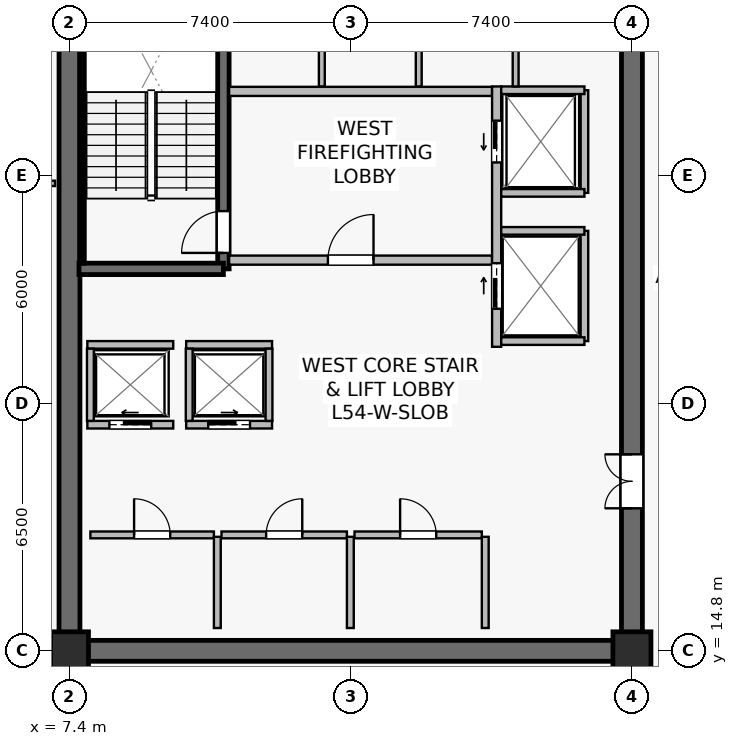
"""IFC4 building model, lengths in metres.
Left out: names, types, materials, properties, quantities, classifications, styles, units other than length and angle.
Written with IfcOpenShell. Run it as: python <this file> out.ifc"""

import sys

from ifc_helpers import new_model, si_unit, direction, frame, frame_2d, origin, origin_2d, place, context, subcontext, project, spatial, rectangle, extrude, source, transform, mapped, element, fill, save


model = new_model("IFC4")
c1 = context("Model", 3, precision=1e-05, world=origin(), true_north=direction((0.0, 1.0)))
c2 = subcontext(c1, "Body", "Model", "MODEL_VIEW")
j1 = project(units=[si_unit("LENGTHUNIT", "METRE"), si_unit("PLANEANGLEUNIT", "RADIAN")], contexts=[c1])
p1 = place(None, origin())
s1 = spatial("IfcSite", under=j1, at=p1, CompositionType="ELEMENT")
p2 = place(p1, origin())
s2 = spatial("IfcBuilding", under=s1, at=p2, CompositionType="ELEMENT")
p3 = place(p2, frame((0.0, 0.0, 226.0)))
s3 = spatial("IfcBuildingStorey", under=s2, at=p3, CompositionType="ELEMENT", Elevation=226.0)
p4 = place(p3, frame((7.125, 14.8, 0.0), z_axis=(0.0, 0.0, 1.0), x_axis=(1.0, 0.0, 0.0)))
e1 = element("IfcWall", 1, at=p4, inside=s3, PredefinedType="SHEAR", context=c2, shape_type="SweptSolid", body=[
    extrude(rectangle(XDim=15.35, YDim=0.55, at=frame_2d((7.675, 0.0))), origin(), (0.0, 0.0, 1.0), 3.8),
])
p5 = place(p3, frame((7.4, 15.075, 0.0), z_axis=(0.0, 0.0, 1.0), x_axis=(0.0, 1.0, 0.0)))
e2 = element("IfcWall", 2, at=p5, inside=s3, PredefinedType="SHEAR", context=c2, shape_type="SweptSolid", body=[
    extrude(rectangle(XDim=18.45, YDim=0.55, at=frame_2d((9.225, 0.0))), origin(), (0.0, 0.0, 1.0), 3.8),
])
p6 = place(p3, frame((22.2, 15.075, 0.0), z_axis=(0.0, 0.0, 1.0), x_axis=(0.0, 1.0, 0.0)))
e3 = element("IfcWall", 3, at=p6, inside=s3, PredefinedType="SHEAR", context=c2, shape_type="SweptSolid", body=[
    extrude(rectangle(XDim=18.45, YDim=0.55, at=frame_2d((9.225, 0.0))), origin(), (0.0, 0.0, 1.0), 3.8),
])
p7 = place(p6, frame((3.475, 0.0, 0.0)))
e4 = element("IfcOpeningElement", 4, at=p7, cuts=e3, PredefinedType="OPENING", context=c2, shape_type="SweptSolid", body=[
    extrude(rectangle(XDim=1.42, YDim=2.2, at=frame_2d((0.71, 1.1))), frame((0.0, 0.285, 0.0), z_axis=(0.0, -1.0, 0.0), x_axis=(1.0, 0.0, 0.0)), (0.0, 0.0, 1.0), 0.57),
])
p8 = place(p3, frame((11.45, 24.85, 0.0), z_axis=(0.0, 0.0, 1.0), x_axis=(0.0, 1.0, 0.0)))
e5 = element("IfcWall", 5, at=p8, inside=s3, PredefinedType="SHEAR", context=c2, shape_type="SweptSolid", body=[
    extrude(rectangle(XDim=8.63, YDim=0.3, at=frame_2d((4.315, 0.0))), origin(), (0.0, 0.0, 1.0), 3.8),
])
p9 = place(p8, frame((0.42, 0.0, 0.0)))
e6 = element("IfcOpeningElement", 6, at=p9, cuts=e5, PredefinedType="OPENING", context=c2, shape_type="SweptSolid", body=[
    extrude(rectangle(XDim=1.1, YDim=2.15, at=frame_2d((0.55, 1.075))), frame((0.0, 0.16, 0.0), z_axis=(0.0, -1.0, 0.0), x_axis=(1.0, 0.0, 0.0)), (0.0, 0.0, 1.0), 0.32),
])
p10 = place(p3, frame((7.65, 24.85, 0.0), z_axis=(0.0, 0.0, 1.0), x_axis=(1.0, 0.0, 0.0)))
e7 = element("IfcWall", 7, at=p10, inside=s3, PredefinedType="SHEAR", context=c2, shape_type="SweptSolid", body=[
    extrude(rectangle(XDim=3.8, YDim=0.3, at=frame_2d((1.9, 0.0))), origin(), (0.0, 0.0, 1.0), 3.8),
])
p11 = place(p3, frame((7.73, 25.0, 0.0), z_axis=(0.0, 0.0, 1.0), x_axis=(0.0, 1.0, 0.0)))
e8 = element("IfcWall", 8, at=p11, inside=s3, PredefinedType="SOLIDWALL", context=c2, shape_type="SweptSolid", body=[
    extrude(rectangle(XDim=8.32, YDim=0.12, at=frame_2d((4.16, 0.0))), origin(), (0.0, 0.0, 1.0), 3.8),
])
m1 = source(origin(), c2, "Body", "SweptSolid", [
    extrude(rectangle(XDim=1.0, YDim=1.0, at=origin_2d()), origin(), (0.0, 0.0, 1.0), 4.1),
])
for number, where, z_axis, x_axis in (
    (9, (7.4, 14.8, 0.0), (0.0, 0.0, 1.0), (1.0, 0.0, 0.0)),
    (10, (22.2, 14.8, 0.0), (0.0, 0.0, 1.0), (1.0, 0.0, 0.0)),
):
    element("IfcColumn", number, at=place(p3, frame(where, z_axis=z_axis, x_axis=x_axis)), inside=s3, PredefinedType="COLUMN", context=c2, shape_type="MappedRepresentation", body=[
        mapped(m1, transform((0.0, 0.0, 0.0), scale=1.0)),
    ])
p12 = place(p3, frame((11.6, 25.08, 0.0), z_axis=(0.0, 0.0, 1.0), x_axis=(1.0, 0.0, 0.0)))
e11 = element("IfcWall", 11, at=p12, inside=s3, PredefinedType="SOLIDWALL", context=c2, shape_type="SweptSolid", body=[
    extrude(rectangle(XDim=6.92, YDim=0.24, at=frame_2d((3.46, 0.0))), origin(), (0.0, 0.0, 1.0), 3.197),
])
p13 = place(p12, frame((2.6, 0.0, 0.0)))
e12 = element("IfcOpeningElement", 12, at=p13, cuts=e11, PredefinedType="OPENING", context=c2, shape_type="SweptSolid", body=[
    extrude(rectangle(XDim=1.2, YDim=2.16, at=frame_2d((0.6, 1.08))), frame((0.0, 0.13, 0.0), z_axis=(0.0, -1.0, 0.0), x_axis=(1.0, 0.0, 0.0)), (0.0, 0.0, 1.0), 0.26),
])
p14 = place(p3, frame((11.6, 29.52, 0.0), z_axis=(0.0, 0.0, 1.0), x_axis=(1.0, 0.0, 0.0)))
e13 = element("IfcWall", 13, at=p14, inside=s3, PredefinedType="SOLIDWALL", context=c2, shape_type="SweptSolid", body=[
    extrude(rectangle(XDim=6.92, YDim=0.24, at=frame_2d((3.46, 0.0))), origin(), (0.0, 0.0, 1.0), 3.197),
])
p15 = place(p3, frame((18.64, 22.8, 0.0), z_axis=(0.0, 0.0, 1.0), x_axis=(0.0, 1.0, 0.0)))
e14 = element("IfcWall", 14, at=p15, inside=s3, PredefinedType="SOLIDWALL", context=c2, shape_type="SweptSolid", body=[
    extrude(rectangle(XDim=6.85, YDim=0.24, at=frame_2d((3.425, 0.0))), origin(), (0.0, 0.0, 1.0), 2.935),
])
p16 = place(p15, frame((4.85, 0.0, 0.0)))
e15 = element("IfcOpeningElement", 15, at=p16, cuts=e14, PredefinedType="OPENING", context=c2, shape_type="SweptSolid", body=[
    extrude(rectangle(XDim=1.1, YDim=2.22, at=frame_2d((0.55, 1.11))), frame((0.0, 0.13, 0.0), z_axis=(0.0, -1.0, 0.0), x_axis=(1.0, 0.0, 0.0)), (0.0, 0.0, 1.0), 0.26),
])
p17 = place(p15, frame((1.0, 0.0, 0.0)))
e16 = element("IfcOpeningElement", 16, at=p17, cuts=e14, PredefinedType="OPENING", context=c2, shape_type="SweptSolid", body=[
    extrude(rectangle(XDim=1.2, YDim=2.22, at=frame_2d((0.6, 1.11))), frame((0.0, 0.13, 0.0), z_axis=(0.0, -1.0, 0.0), x_axis=(1.0, 0.0, 0.0)), (0.0, 0.0, 1.0), 0.26),
])
p18 = place(p3, frame((7.87, 20.75, 0.0), z_axis=(0.0, 0.0, 1.0), x_axis=(1.0, 0.0, 0.0)))
e17 = element("IfcWall", 17, at=p18, inside=s3, PredefinedType="SOLIDWALL", context=c2, shape_type="SweptSolid", body=[
    extrude(rectangle(XDim=2.26, YDim=0.2, at=frame_2d((1.13, 0.0))), origin(), (0.0, 0.0, 1.0), 3.8),
])
p19 = place(p18, frame((0.58, 0.0, 0.0)))
e18 = element("IfcOpeningElement", 18, at=p19, cuts=e17, PredefinedType="OPENING", context=c2, shape_type="SweptSolid", body=[
    extrude(rectangle(XDim=1.1, YDim=2.22, at=frame_2d((0.55, 1.11))), frame((0.0, 0.11, 0.0), z_axis=(0.0, -1.0, 0.0), x_axis=(1.0, 0.0, 0.0)), (0.0, 0.0, 1.0), 0.22),
])
p20 = place(p3, frame((7.87, 22.85, 0.0), z_axis=(0.0, 0.0, 1.0), x_axis=(1.0, 0.0, 0.0)))
e19 = element("IfcWall", 19, at=p20, inside=s3, PredefinedType="SOLIDWALL", context=c2, shape_type="SweptSolid", body=[
    extrude(rectangle(XDim=2.26, YDim=0.2, at=frame_2d((1.13, 0.0))), origin(), (0.0, 0.0, 1.0), 3.8),
])
p21 = place(p3, frame((7.95, 20.85, 0.0), z_axis=(0.0, 0.0, 1.0), x_axis=(0.0, 1.0, 0.0)))
e20 = element("IfcWall", 20, at=p21, inside=s3, PredefinedType="SOLIDWALL", context=c2, shape_type="SweptSolid", body=[
    extrude(rectangle(XDim=1.9, YDim=0.18, at=frame_2d((0.95, 0.0))), origin(), (0.0, 0.0, 1.0), 3.8),
])
p22 = place(p3, frame((10.47, 20.75, 0.0), z_axis=(0.0, 0.0, 1.0), x_axis=(1.0, 0.0, 0.0)))
e21 = element("IfcWall", 21, at=p22, inside=s3, PredefinedType="SOLIDWALL", context=c2, shape_type="SweptSolid", body=[
    extrude(rectangle(XDim=2.26, YDim=0.2, at=frame_2d((1.13, 0.0))), origin(), (0.0, 0.0, 1.0), 3.8),
])
p23 = place(p22, frame((0.58, 0.0, 0.0)))
e22 = element("IfcOpeningElement", 22, at=p23, cuts=e21, PredefinedType="OPENING", context=c2, shape_type="SweptSolid", body=[
    extrude(rectangle(XDim=1.1, YDim=2.22, at=frame_2d((0.55, 1.11))), frame((0.0, 0.11, 0.0), z_axis=(0.0, -1.0, 0.0), x_axis=(1.0, 0.0, 0.0)), (0.0, 0.0, 1.0), 0.22),
])
p24 = place(p3, frame((10.47, 22.85, 0.0), z_axis=(0.0, 0.0, 1.0), x_axis=(1.0, 0.0, 0.0)))
e23 = element("IfcWall", 23, at=p24, inside=s3, PredefinedType="SOLIDWALL", context=c2, shape_type="SweptSolid", body=[
    extrude(rectangle(XDim=2.26, YDim=0.2, at=frame_2d((1.13, 0.0))), origin(), (0.0, 0.0, 1.0), 3.8),
])
for number, where, z_axis, x_axis in (
    (24, (10.55, 20.85, 0.0), (0.0, 0.0, 1.0), (0.0, 1.0, 0.0)),
    (25, (12.65, 20.85, 0.0), (0.0, 0.0, 1.0), (0.0, 1.0, 0.0)),
):
    element("IfcWall", number, at=place(p3, frame(where, z_axis=z_axis, x_axis=x_axis)), inside=s3, PredefinedType="SOLIDWALL", context=c2, shape_type="SweptSolid", body=[
        extrude(rectangle(XDim=1.9, YDim=0.18, at=frame_2d((0.95, 0.0))), origin(), (0.0, 0.0, 1.0), 3.8),
    ])
p25 = place(p3, frame((20.95, 26.85, 0.0), z_axis=(0.0, 0.0, 1.0), x_axis=(0.0, 1.0, 0.0)))
e26 = element("IfcWall", 26, at=p25, inside=s3, PredefinedType="SOLIDWALL", context=c2, shape_type="SweptSolid", body=[
    extrude(rectangle(XDim=2.7, YDim=0.2, at=frame_2d((1.35, 0.0))), origin(), (0.0, 0.0, 1.0), 3.8),
])
p26 = place(p3, frame((18.76, 29.55, 0.0), z_axis=(0.0, 0.0, 1.0), x_axis=(1.0, 0.0, 0.0)))
e27 = element("IfcWall", 27, at=p26, inside=s3, PredefinedType="SOLIDWALL", context=c2, shape_type="SweptSolid", body=[
    extrude(rectangle(XDim=2.19, YDim=0.2, at=frame_2d((1.095, 0.0))), origin(), (0.0, 0.0, 1.0), 3.8),
])
p27 = place(p3, frame((18.76, 26.85, 0.0), z_axis=(0.0, 0.0, 1.0), x_axis=(1.0, 0.0, 0.0)))
e28 = element("IfcWall", 28, at=p27, inside=s3, PredefinedType="SOLIDWALL", context=c2, shape_type="SweptSolid", body=[
    extrude(rectangle(XDim=2.19, YDim=0.2, at=frame_2d((1.095, 0.0))), origin(), (0.0, 0.0, 1.0), 3.197),
])
p28 = place(p3, frame((20.95, 22.95, 0.0), z_axis=(0.0, 0.0, 1.0), x_axis=(0.0, 1.0, 0.0)))
e29 = element("IfcWall", 29, at=p28, inside=s3, PredefinedType="SOLIDWALL", context=c2, shape_type="SweptSolid", body=[
    extrude(rectangle(XDim=2.9, YDim=0.2, at=frame_2d((1.45, 0.0))), origin(), (0.0, 0.0, 1.0), 2.935),
])
for number, where, z_axis, x_axis in (
    (30, (18.76, 25.85, 0.0), (0.0, 0.0, 1.0), (1.0, 0.0, 0.0)),
    (31, (18.76, 22.95, 0.0), (0.0, 0.0, 1.0), (1.0, 0.0, 0.0)),
):
    element("IfcWall", number, at=place(p3, frame(where, z_axis=z_axis, x_axis=x_axis)), inside=s3, PredefinedType="SOLIDWALL", context=c2, shape_type="SweptSolid", body=[
        extrude(rectangle(XDim=2.19, YDim=0.2, at=frame_2d((1.095, 0.0))), origin(), (0.0, 0.0, 1.0), 3.8),
    ])
p29 = place(p3, frame((7.95, 17.85, 0.0), z_axis=(0.0, 0.0, 1.0), x_axis=(1.0, 0.0, 0.0)))
e32 = element("IfcWall", 32, at=p29, inside=s3, PredefinedType="SOLIDWALL", context=c2, shape_type="SweptSolid", body=[
    extrude(rectangle(XDim=3.25, YDim=0.18, at=frame_2d((1.625, 0.0))), origin(), (0.0, 0.0, 1.0), 3.8),
])
p30 = place(p29, frame((1.15, 0.0, 0.0)))
e33 = element("IfcOpeningElement", 33, at=p30, cuts=e32, PredefinedType="OPENING", context=c2, shape_type="SweptSolid", body=[
    extrude(rectangle(XDim=0.95, YDim=2.15, at=frame_2d((0.475, 1.075))), frame((0.0, 0.1, 0.0), z_axis=(0.0, -1.0, 0.0), x_axis=(1.0, 0.0, 0.0)), (0.0, 0.0, 1.0), 0.2),
])
p31 = place(p3, frame((11.29, 15.4, 0.0), z_axis=(0.0, 0.0, 1.0), x_axis=(0.0, 1.0, 0.0)))
e34 = element("IfcWall", 34, at=p31, inside=s3, PredefinedType="SOLIDWALL", context=c2, shape_type="SweptSolid", body=[
    extrude(rectangle(XDim=2.4, YDim=0.18, at=frame_2d((1.2, 0.0))), origin(), (0.0, 0.0, 1.0), 3.8),
])
p32 = place(p3, frame((11.4, 17.85, 0.0), z_axis=(0.0, 0.0, 1.0), x_axis=(1.0, 0.0, 0.0)))
e35 = element("IfcWall", 35, at=p32, inside=s3, PredefinedType="SOLIDWALL", context=c2, shape_type="SweptSolid", body=[
    extrude(rectangle(XDim=3.3, YDim=0.18, at=frame_2d((1.65, 0.0))), origin(), (0.0, 0.0, 1.0), 3.197),
])
p33 = place(p32, frame((1.175, 0.0, 0.0)))
e36 = element("IfcOpeningElement", 36, at=p33, cuts=e35, PredefinedType="OPENING", context=c2, shape_type="SweptSolid", body=[
    extrude(rectangle(XDim=0.95, YDim=2.15, at=frame_2d((0.475, 1.075))), frame((0.0, 0.1, 0.0), z_axis=(0.0, -1.0, 0.0), x_axis=(1.0, 0.0, 0.0)), (0.0, 0.0, 1.0), 0.2),
])
p34 = place(p3, frame((14.79, 15.4, 0.0), z_axis=(0.0, 0.0, 1.0), x_axis=(0.0, 1.0, 0.0)))
e37 = element("IfcWall", 37, at=p34, inside=s3, PredefinedType="SOLIDWALL", context=c2, shape_type="SweptSolid", body=[
    extrude(rectangle(XDim=2.4, YDim=0.18, at=frame_2d((1.2, 0.0))), origin(), (0.0, 0.0, 1.0), 3.197),
])
p35 = place(p3, frame((14.9, 17.85, 0.0), z_axis=(0.0, 0.0, 1.0), x_axis=(1.0, 0.0, 0.0)))
e38 = element("IfcWall", 38, at=p35, inside=s3, PredefinedType="SOLIDWALL", context=c2, shape_type="SweptSolid", body=[
    extrude(rectangle(XDim=3.35, YDim=0.18, at=frame_2d((1.675, 0.0))), origin(), (0.0, 0.0, 1.0), 3.197),
])
p36 = place(p35, frame((1.2, 0.0, 0.0)))
e39 = element("IfcOpeningElement", 39, at=p36, cuts=e38, PredefinedType="OPENING", context=c2, shape_type="SweptSolid", body=[
    extrude(rectangle(XDim=0.95, YDim=2.15, at=frame_2d((0.475, 1.075))), frame((0.0, 0.1, 0.0), z_axis=(0.0, -1.0, 0.0), x_axis=(1.0, 0.0, 0.0)), (0.0, 0.0, 1.0), 0.2),
])
p37 = place(p3, frame((18.34, 15.4, 0.0), z_axis=(0.0, 0.0, 1.0), x_axis=(0.0, 1.0, 0.0)))
e40 = element("IfcWall", 40, at=p37, inside=s3, PredefinedType="SOLIDWALL", context=c2, shape_type="SweptSolid", body=[
    extrude(rectangle(XDim=2.4, YDim=0.18, at=frame_2d((1.2, 0.0))), origin(), (0.0, 0.0, 1.0), 3.8),
])
for number, where, z_axis, x_axis in (
    (41, (14.04, 29.65, 0.0), (0.0, 0.0, 1.0), (0.0, 1.0, 0.0)),
    (42, (16.59, 29.65, 0.0), (0.0, 0.0, 1.0), (0.0, 1.0, 0.0)),
    (43, (19.14, 29.65, 0.0), (0.0, 0.0, 1.0), (0.0, 1.0, 0.0)),
):
    element("IfcWall", number, at=place(p3, frame(where, z_axis=z_axis, x_axis=x_axis)), inside=s3, PredefinedType="PLUMBINGWALL", context=c2, shape_type="SweptSolid", body=[
        extrude(rectangle(XDim=3.93, YDim=0.155, at=frame_2d((1.965, 0.0))), origin(), (0.0, 0.0, 1.0), 3.8),
    ])
p38 = place(p3, frame((4.11, 27.1, 0.0), z_axis=(0.0, 0.0, 1.0), x_axis=(1.0, 0.0, 0.0)))
e44 = element("IfcWall", 44, at=p38, inside=s3, PredefinedType="PARTITIONING", context=c2, shape_type="SweptSolid", body=[
    extrude(rectangle(XDim=2.91, YDim=0.14, at=frame_2d((1.455, 0.0))), origin(), (0.0, 0.0, 1.0), 3.8),
])
p39 = place(p3, frame((4.11, 14.505, 0.0), z_axis=(0.0, 0.0, 1.0), x_axis=(1.0, 0.0, 0.0)))
e45 = element("IfcWall", 45, at=p39, inside=s3, PredefinedType="PARTITIONING", context=c2, shape_type="SweptSolid", body=[
    extrude(rectangle(XDim=2.91, YDim=0.14, at=frame_2d((1.455, 0.0))), origin(), (0.0, 0.0, 1.0), 3.8),
])
p40 = place(p39, frame((1.005, 0.0, 0.0)))
e46 = element("IfcOpeningElement", 46, at=p40, cuts=e45, PredefinedType="OPENING", context=c2, shape_type="SweptSolid", body=[
    extrude(rectangle(XDim=0.9, YDim=2.1, at=frame_2d((0.45, 1.05))), frame((0.0, 0.08, 0.0), z_axis=(0.0, -1.0, 0.0), x_axis=(1.0, 0.0, 0.0)), (0.0, 0.0, 1.0), 0.16),
])
m2 = source(origin(), c2, "Body", "SweptSolid", [
    extrude(rectangle(XDim=1.1, YDim=2.15, at=frame_2d((0.55, 1.075))), frame((0.0, 0.025, 0.0), z_axis=(0.0, -1.0, 0.0), x_axis=(1.0, 0.0, 0.0)), (0.0, 0.0, 1.0), 0.05),
])
p41 = place(p9, origin())
e47 = element("IfcDoor", 47, at=p41, inside=s3, OperationType="SINGLE_SWING_LEFT", PredefinedType="DOOR", context=c2, shape_type="MappedRepresentation", body=[
    mapped(m2, transform((0.0, 0.0, 0.0), scale=1.0)),
])
fill(e6, e47)
m3 = source(origin(), c2, "Body", "SweptSolid", [
    extrude(rectangle(XDim=1.2, YDim=2.16, at=frame_2d((0.6, 1.08))), frame((0.0, 0.025, 0.0), z_axis=(0.0, -1.0, 0.0), x_axis=(1.0, 0.0, 0.0)), (0.0, 0.0, 1.0), 0.05),
])
p42 = place(p13, origin())
e48 = element("IfcDoor", 48, at=p42, inside=s3, OperationType="SINGLE_SWING_RIGHT", PredefinedType="DOOR", context=c2, shape_type="MappedRepresentation", body=[
    mapped(m3, transform((0.0, 0.0, 0.0), scale=1.0)),
])
fill(e12, e48)
m4 = source(origin(), c2, "Body", "SweptSolid", [
    extrude(rectangle(XDim=1.1, YDim=2.22, at=frame_2d((0.55, 1.11))), frame((0.0, 0.025, 0.0), z_axis=(0.0, -1.0, 0.0), x_axis=(1.0, 0.0, 0.0)), (0.0, 0.0, 1.0), 0.05),
])
p43 = place(p19, origin())
e49 = element("IfcDoor", 49, at=p43, inside=s3, OperationType="SLIDING_TO_LEFT", PredefinedType="USERDEFINED", context=c2, shape_type="MappedRepresentation", body=[
    mapped(m4, transform((0.0, 0.0, 0.0), scale=1.0)),
])
fill(e18, e49)
p44 = place(p23, origin())
e50 = element("IfcDoor", 50, at=p44, inside=s3, OperationType="SLIDING_TO_RIGHT", PredefinedType="USERDEFINED", context=c2, shape_type="MappedRepresentation", body=[
    mapped(m4, transform((0.0, 0.0, 0.0), scale=1.0)),
])
fill(e22, e50)
p45 = place(p16, origin())
e51 = element("IfcDoor", 51, at=p45, inside=s3, OperationType="SLIDING_TO_LEFT", PredefinedType="USERDEFINED", context=c2, shape_type="MappedRepresentation", body=[
    mapped(m4, transform((0.0, 0.0, 0.0), scale=1.0)),
])
fill(e15, e51)
m5 = source(origin(), c2, "Body", "SweptSolid", [
    extrude(rectangle(XDim=1.2, YDim=2.22, at=frame_2d((0.6, 1.11))), frame((0.0, 0.025, 0.0), z_axis=(0.0, -1.0, 0.0), x_axis=(1.0, 0.0, 0.0)), (0.0, 0.0, 1.0), 0.05),
])
p46 = place(p17, origin())
e52 = element("IfcDoor", 52, at=p46, inside=s3, OperationType="SLIDING_TO_RIGHT", PredefinedType="USERDEFINED", context=c2, shape_type="MappedRepresentation", body=[
    mapped(m5, transform((0.0, 0.0, 0.0), scale=1.0)),
])
fill(e16, e52)
m6 = source(origin(), c2, "Body", "SweptSolid", [
    extrude(rectangle(XDim=0.95, YDim=2.15, at=frame_2d((0.475, 1.075))), frame((0.0, 0.025, 0.0), z_axis=(0.0, -1.0, 0.0), x_axis=(1.0, 0.0, 0.0)), (0.0, 0.0, 1.0), 0.05),
])
p47 = place(p30, origin())
e53 = element("IfcDoor", 53, at=p47, inside=s3, OperationType="SINGLE_SWING_LEFT", PredefinedType="DOOR", context=c2, shape_type="MappedRepresentation", body=[
    mapped(m6, transform((0.0, 0.0, 0.0), scale=1.0)),
])
fill(e33, e53)
p48 = place(p33, origin())
e54 = element("IfcDoor", 54, at=p48, inside=s3, OperationType="SINGLE_SWING_RIGHT", PredefinedType="DOOR", context=c2, shape_type="MappedRepresentation", body=[
    mapped(m6, transform((0.0, 0.0, 0.0), scale=1.0)),
])
fill(e36, e54)
p49 = place(p36, origin())
e55 = element("IfcDoor", 55, at=p49, inside=s3, OperationType="SINGLE_SWING_LEFT", PredefinedType="DOOR", context=c2, shape_type="MappedRepresentation", body=[
    mapped(m6, transform((0.0, 0.0, 0.0), scale=1.0)),
])
fill(e39, e55)
m7 = source(origin(), c2, "Body", "SweptSolid", [
    extrude(rectangle(XDim=1.42, YDim=2.2, at=frame_2d((0.71, 1.1))), frame((0.0, 0.025, 0.0), z_axis=(0.0, -1.0, 0.0), x_axis=(1.0, 0.0, 0.0)), (0.0, 0.0, 1.0), 0.05),
])
p50 = place(p7, origin())
e56 = element("IfcDoor", 56, at=p50, inside=s3, OperationType="DOUBLE_DOOR_SINGLE_SWING", PredefinedType="DOOR", context=c2, shape_type="MappedRepresentation", body=[
    mapped(m7, transform((0.0, 0.0, 0.0), scale=1.0)),
])
fill(e4, e56)
save(model, sys.argv[1])
